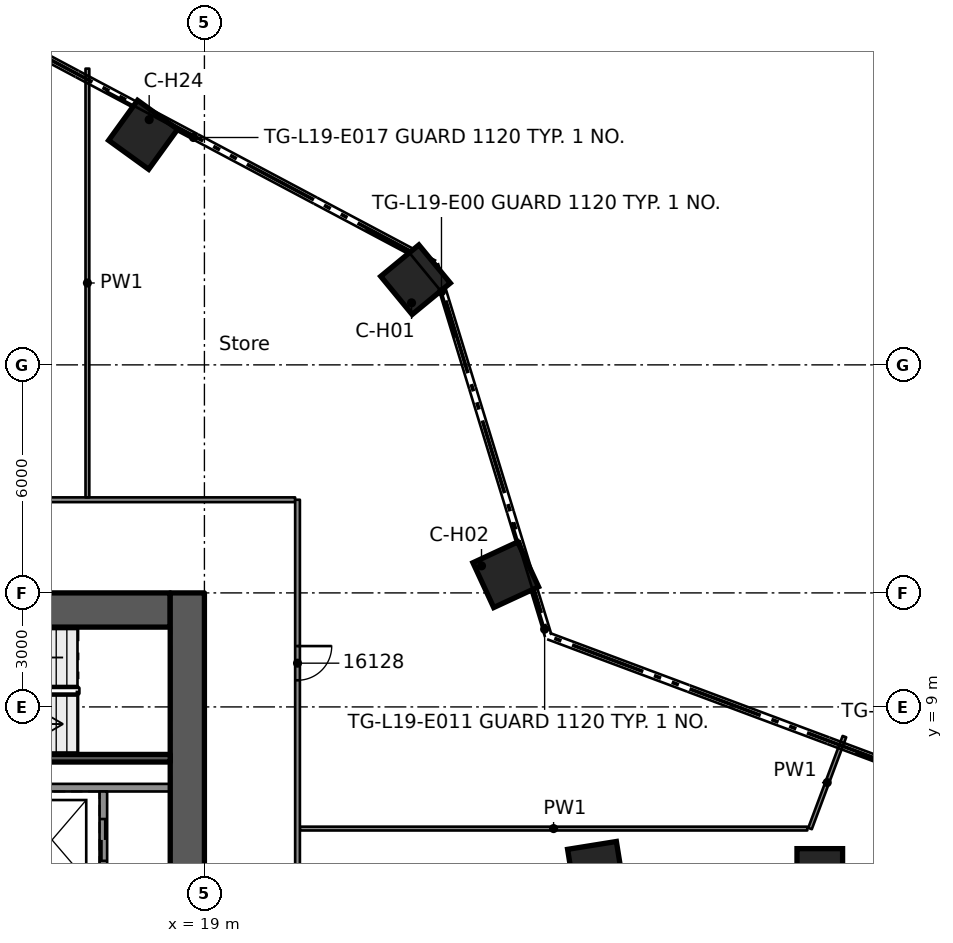
"""IFC4 building model, lengths in metres.
Left out: names, types, materials, properties, quantities, classifications, styles, units other than length and angle.
Written with IfcOpenShell. Run it as: python <this file> out.ifc"""

import sys

from ifc_helpers import new_model, si_unit, direction, frame, frame_2d, origin, origin_2d, place, context, subcontext, project, spatial, rectangle, extrude, element, fill, save


model = new_model("IFC4")
c1 = context("Model", 3, precision=1e-05, world=origin(), true_north=direction((0.0, 1.0)))
c2 = subcontext(c1, "Body", "Model", "MODEL_VIEW")
j1 = project(units=[si_unit("LENGTHUNIT", "METRE"), si_unit("PLANEANGLEUNIT", "RADIAN")], contexts=[c1])
p1 = place(None, origin())
s1 = spatial("IfcSite", under=j1, at=p1, CompositionType="ELEMENT")
p2 = place(p1, origin())
s2 = spatial("IfcBuilding", under=s1, at=p2, CompositionType="ELEMENT")
p3 = place(p2, frame((0.0, 0.0, 80.7)))
s3 = spatial("IfcBuildingStorey", under=s2, at=p3, CompositionType="ELEMENT", Elevation=80.7)
p4 = place(p3, frame((8.9, 11.55, 0.0), z_axis=(0.0, 0.0, 1.0), x_axis=(1.0, 0.0, 0.0)))
e1 = element("IfcWall", 1, at=p4, inside=s3, PredefinedType="SHEAR", context=c2, shape_type="SweptSolid", body=[
    extrude(rectangle(XDim=9.2, YDim=0.9, at=frame_2d((4.6, 0.0))), origin(), (0.0, 0.0, 1.0), 3.5),
])
p5 = place(p4, frame((3.0, 0.0, 0.0)))
e2 = element("IfcOpeningElement", 2, at=p5, cuts=e1, PredefinedType="OPENING", context=c2, shape_type="SweptSolid", body=[
    extrude(rectangle(XDim=1.1, YDim=2.1, at=frame_2d((0.55, 1.05))), frame((0.0, 0.46, 0.0), z_axis=(0.0, -1.0, 0.0), x_axis=(1.0, 0.0, 0.0)), (0.0, 0.0, 1.0), 0.92),
])
p6 = place(p3, frame((18.55, -12.0, 0.0), z_axis=(0.0, 0.0, 1.0), x_axis=(0.0, 1.0, 0.0)))
e3 = element("IfcWall", 3, at=p6, inside=s3, PredefinedType="SHEAR", context=c2, shape_type="SweptSolid", body=[
    extrude(rectangle(XDim=24.0, YDim=0.9, at=frame_2d((12.0, 0.0))), origin(), (0.0, 0.0, 1.0), 3.5),
])
p7 = place(p6, frame((12.1, 0.0, 0.0)))
e4 = element("IfcOpeningElement", 4, at=p7, cuts=e3, PredefinedType="OPENING", context=c2, shape_type="SweptSolid", body=[
    extrude(rectangle(XDim=1.8, YDim=2.1, at=frame_2d((0.9, 1.05))), frame((0.0, 0.46, 0.0), z_axis=(0.0, -1.0, 0.0), x_axis=(1.0, 0.0, 0.0)), (0.0, 0.0, 1.0), 0.92),
])
p8 = place(p3, frame((35.193, 4.771, 0.0), z_axis=(0.0, 0.0, 1.0), x_axis=(1.0, 0.0, 0.0)))
e5 = element("IfcColumn", 5, at=p8, inside=s3, PredefinedType="COLUMN", context=c2, shape_type="SweptSolid", body=[
    extrude(rectangle(XDim=1.2, YDim=1.0, at=origin_2d()), origin(), (0.0, 0.0, 1.0), 3.5),
])
for number, where, z_axis, x_axis in (
    (6, (24.555, 20.241, 0.0), (0.0, 0.0, 1.0), (0.772, 0.636, 0.0)),
    (7, (26.929, 12.478, 0.0), (0.0, 0.0, 1.0), (0.907, 0.42, 0.0)),
    (8, (29.302, 4.714, 0.0), (0.0, 0.0, 1.0), (0.987, 0.159, 0.0)),
    (9, (17.387, 24.053, 0.0), (0.0, 0.0, 1.0), (0.586, 0.81, 0.0)),
):
    element("IfcColumn", number, at=place(p3, frame(where, z_axis=z_axis, x_axis=x_axis)), inside=s3, PredefinedType="COLUMN", context=c2, shape_type="SweptSolid", body=[
        extrude(rectangle(XDim=1.3, YDim=1.3, at=origin_2d()), origin(), (0.0, 0.0, 1.0), 3.5),
    ])
p9 = place(p3, frame((11.54, 6.875, 0.0), z_axis=(0.0, 0.0, 1.0), x_axis=(1.0, 0.0, 0.0)))
e10 = element("IfcWall", 10, at=p9, inside=s3, PredefinedType="SOLIDWALL", context=c2, shape_type="SweptSolid", body=[
    extrude(rectangle(XDim=6.56, YDim=0.2, at=frame_2d((3.28, 0.0))), origin(), (0.0, 0.0, 1.0), 3.09),
])
p10 = place(p3, frame((16.34, 6.775, 0.0), z_axis=(0.0, 0.0, 1.0), x_axis=(0.0, -1.0, 0.0)))
e11 = element("IfcWall", 11, at=p10, inside=s3, PredefinedType="SOLIDWALL", context=c2, shape_type="SweptSolid", body=[
    extrude(rectangle(XDim=2.75, YDim=0.2, at=frame_2d((1.375, 0.0))), origin(), (0.0, 0.0, 1.0), 3.09),
])
p11 = place(p10, frame((0.725, 0.0, 0.0)))
e12 = element("IfcOpeningElement", 12, at=p11, cuts=e11, PredefinedType="OPENING", context=c2, shape_type="SweptSolid", body=[
    extrude(rectangle(XDim=1.1, YDim=2.1, at=frame_2d((0.55, 1.05))), frame((0.0, 0.11, 0.0), z_axis=(0.0, -1.0, 0.0), x_axis=(1.0, 0.0, 0.0)), (0.0, 0.0, 1.0), 0.22),
])
p12 = place(p3, frame((11.54, 7.65, 0.0), z_axis=(0.0, 0.0, 1.0), x_axis=(1.0, 0.0, 0.0)))
e13 = element("IfcWall", 13, at=p12, inside=s3, PredefinedType="SOLIDWALL", context=c2, shape_type="SweptSolid", body=[
    extrude(rectangle(XDim=6.56, YDim=0.2, at=frame_2d((3.28, 0.0))), origin(), (0.0, 0.0, 1.0), 3.09),
])
p13 = place(p3, frame((21.512, 5.799, 0.0), z_axis=(0.0, 0.0, 1.0), x_axis=(1.0, 0.0, 0.0)))
e14 = element("IfcWall", 14, at=p13, inside=s3, PredefinedType="PARTITIONING", context=c2, shape_type="SweptSolid", body=[
    extrude(rectangle(XDim=13.352, YDim=0.1, at=frame_2d((6.676, 0.0))), origin(), (0.0, 0.0, 1.0), 3.08),
])
p14 = place(p3, frame((10.391, 14.451, 0.0), z_axis=(0.0, 0.0, 1.0), x_axis=(1.0, 0.0, 0.0)))
e15 = element("IfcWall", 15, at=p14, inside=s3, PredefinedType="PARTITIONING", context=c2, shape_type="SweptSolid", body=[
    extrude(rectangle(XDim=10.996, YDim=0.125, at=frame_2d((5.498, 0.0))), origin(), (0.0, 0.0, 1.0), 3.08),
])
p15 = place(p3, frame((34.936, 5.8, 0.0), z_axis=(0.0, 0.0, 1.0), x_axis=(0.350418907124, 0.936593075743, 0.0)))
e16 = element("IfcWall", 16, at=p15, inside=s3, PredefinedType="PARTITIONING", context=c2, shape_type="SweptSolid", body=[
    extrude(rectangle(XDim=2.583, YDim=0.1, at=frame_2d((1.292, 0.0))), origin(), (0.0, 0.0, 1.0), 3.08),
])
p16 = place(p3, frame((21.45, 14.451, 0.0), z_axis=(0.0, 0.0, 1.0), x_axis=(0.0, -1.0, 0.0)))
e17 = element("IfcWall", 17, at=p16, inside=s3, PredefinedType="PARTITIONING", context=c2, shape_type="SweptSolid", body=[
    extrude(rectangle(XDim=17.301, YDim=0.125, at=frame_2d((8.65, 0.0))), origin(), (0.0, 0.0, 1.0), 3.08),
])
p17 = place(p16, frame((12.002, 0.0, 0.0)))
e18 = element("IfcOpeningElement", 18, at=p17, cuts=e17, PredefinedType="OPENING", context=c2, shape_type="SweptSolid", body=[
    extrude(rectangle(XDim=1.8, YDim=2.1, at=frame_2d((0.9, 1.05))), frame((0.0, 0.073, 0.0), z_axis=(0.0, -1.0, 0.0), x_axis=(1.0, 0.0, 0.0)), (0.0, 0.0, 1.0), 0.145),
])
p18 = place(p16, frame((3.85, 0.0, 0.0)))
e19 = element("IfcOpeningElement", 19, at=p18, cuts=e17, PredefinedType="OPENING", context=c2, shape_type="SweptSolid", body=[
    extrude(rectangle(XDim=0.9, YDim=2.1, at=frame_2d((0.45, 1.05))), frame((0.0, 0.073, 0.0), z_axis=(0.0, -1.0, 0.0), x_axis=(1.0, 0.0, 0.0)), (0.0, 0.0, 1.0), 0.145),
])
p19 = place(p3, frame((15.921, 14.514, 0.0), z_axis=(0.0, 0.0, 1.0), x_axis=(0.0, 1.0, 0.0)))
e20 = element("IfcWall", 20, at=p19, inside=s3, PredefinedType="PARTITIONING", context=c2, shape_type="SweptSolid", body=[
    extrude(rectangle(XDim=11.281, YDim=0.1, at=frame_2d((5.641, 0.0))), origin(), (0.0, 0.0, 1.0), 3.08),
])
p20 = place(p11, origin())
e21 = element("IfcDoor", 21, at=p20, inside=s3, OperationType="DOUBLE_DOOR_SLIDING", PredefinedType="DOOR", context=c2, shape_type="SweptSolid", body=[
    extrude(rectangle(XDim=1.1, YDim=2.1, at=frame_2d((0.55, 1.05))), frame((0.0, 0.025, 0.0), z_axis=(0.0, -1.0, 0.0), x_axis=(1.0, 0.0, 0.0)), (0.0, 0.0, 1.0), 0.05),
])
fill(e12, e21)
p21 = place(p18, origin())
e22 = element("IfcDoor", 22, at=p21, inside=s3, OperationType="SINGLE_SWING_LEFT", PredefinedType="DOOR", context=c2, shape_type="SweptSolid", body=[
    extrude(rectangle(XDim=0.9, YDim=2.1, at=frame_2d((0.45, 1.05))), frame((0.0, 0.025, 0.0), z_axis=(0.0, -1.0, 0.0), x_axis=(1.0, 0.0, 0.0)), (0.0, 0.0, 1.0), 0.05),
])
fill(e19, e22)
save(model, sys.argv[1])
